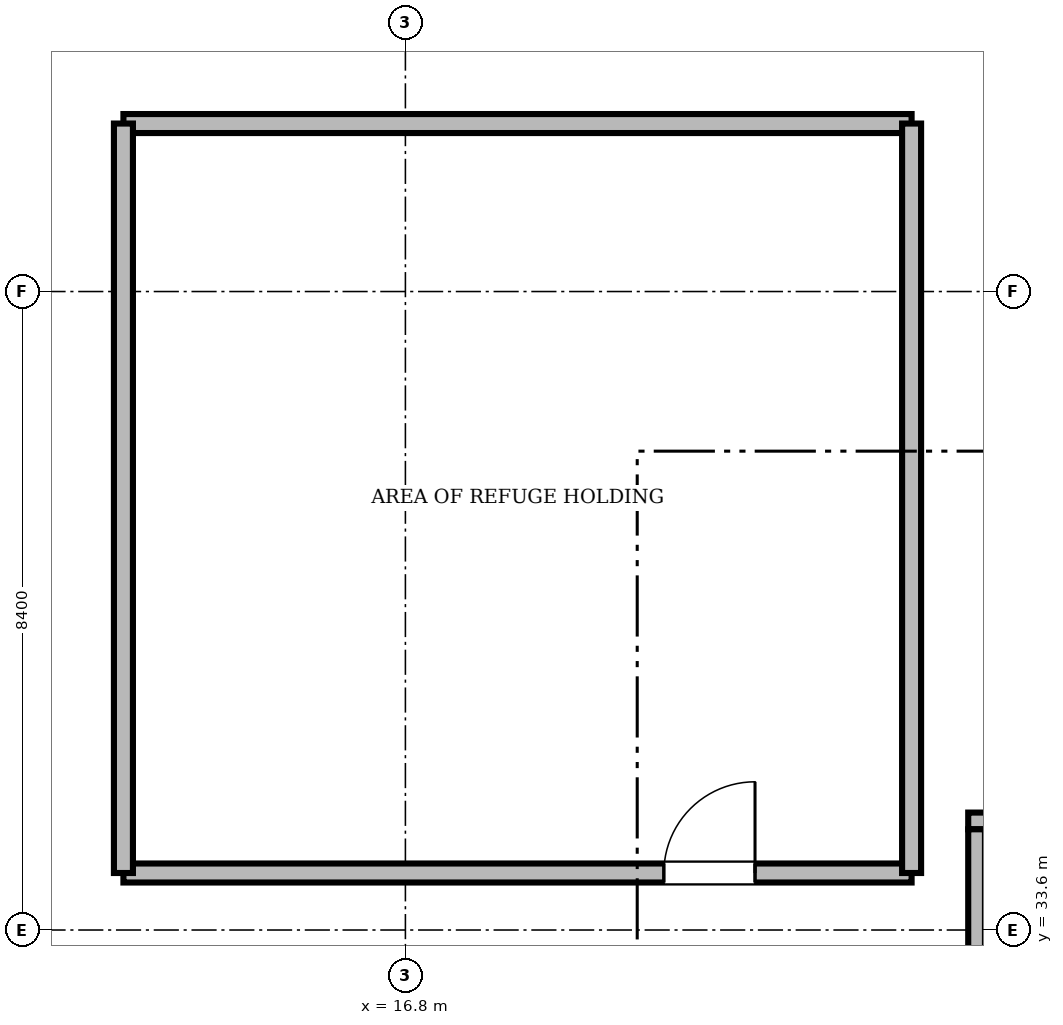
"""IFC4 building model, lengths in metres.
Left out: names, types, materials, properties, quantities, classifications, styles, units other than length and angle.
Written with IfcOpenShell. Run it as: python <this file> out.ifc"""

import sys

from ifc_helpers import new_model, si_unit, direction, frame, frame_2d, origin, origin_2d, place, context, subcontext, project, spatial, rectangle, i_section, extrude, source, transform, mapped, element, fill, save


model = new_model("IFC4")
c1 = context("Model", 3, precision=1e-05, world=origin(), true_north=direction((0.0, 1.0)))
c2 = subcontext(c1, "Body", "Model", "MODEL_VIEW")
j1 = project(units=[si_unit("LENGTHUNIT", "METRE"), si_unit("PLANEANGLEUNIT", "RADIAN")], contexts=[c1])
p1 = place(None, origin())
s1 = spatial("IfcSite", under=j1, at=p1, CompositionType="ELEMENT")
p2 = place(p1, origin())
s2 = spatial("IfcBuilding", under=s1, at=p2, CompositionType="ELEMENT")
p3 = place(p2, frame((0.0, 0.0, 166.8)))
s3 = spatial("IfcBuildingStorey", under=s2, at=p3, CompositionType="ELEMENT", Elevation=166.8)
m1 = source(origin(), c2, "Body", "SweptSolid", [
    extrude(rectangle(XDim=1.6, YDim=1.6, at=origin_2d()), origin(), (0.0, 0.0, 1.0), 6.543),
])
p4 = place(p3, frame((7.75, 36.54, 0.0), z_axis=(0.687744647911, 0.0, 0.725952683906), x_axis=(0.0, 1.0, 0.0)))
e1 = element("IfcColumn", 1, at=p4, inside=s3, PredefinedType="COLUMN", context=c2, shape_type="MappedRepresentation", body=[
    mapped(m1, transform((0.0, 0.0, 0.0), scale=1.0)),
])
m2 = source(origin(), c2, "Body", "SweptSolid", [
    extrude(i_section(OverallWidth=0.414, OverallDepth=0.432, WebThickness=0.026, FlangeThickness=0.04, FilletRadius=0.015, at=origin_2d()), origin(), (0.0, 0.0, 1.0), 6.543),
])
p5 = place(p3, frame((7.75, 43.45, 0.0), z_axis=(0.687744647911, 0.0, 0.725952683906), x_axis=(0.0, 1.0, 0.0)))
e2 = element("IfcColumn", 2, at=p5, inside=s3, PredefinedType="COLUMN", context=c2, shape_type="MappedRepresentation", body=[
    mapped(m2, transform((0.0, 0.0, 0.0), scale=1.0)),
])
m3 = source(origin(), c2, "Body", "SweptSolid", [
    extrude(rectangle(XDim=1.89, YDim=0.22, at=frame_2d((0.945, 0.0))), origin(), (0.0, 0.0, 1.0), 4.75),
])
p6 = place(p3, frame((24.205, 35.035, 0.0), z_axis=(0.0, 0.0, 1.0), x_axis=(1.0, 0.0, 0.0)))
e3 = element("IfcWall", 3, at=p6, inside=s3, PredefinedType="SOLIDWALL", context=c2, shape_type="MappedRepresentation", body=[
    mapped(m3, transform((0.0, 0.0, 0.0), scale=1.0)),
])
m4 = source(origin(), c2, "Body", "SweptSolid", [
    extrude(rectangle(XDim=1.75, YDim=0.22, at=frame_2d((0.875, 0.0))), origin(), (0.0, 0.0, 1.0), 4.75),
])
p7 = place(p3, frame((24.315, 33.175, 0.0), z_axis=(0.0, 0.0, 1.0), x_axis=(0.0, 1.0, 0.0)))
e4 = element("IfcWall", 4, at=p7, inside=s3, PredefinedType="SOLIDWALL", context=c2, shape_type="MappedRepresentation", body=[
    mapped(m4, transform((0.0, 0.0, 0.0), scale=1.0)),
])
m5 = source(origin(), c2, "Body", "SweptSolid", [
    extrude(rectangle(XDim=10.37, YDim=0.25, at=frame_2d((5.185, 0.0))), origin(), (0.0, 0.0, 1.0), 4.75),
])
p8 = place(p3, frame((13.09, 34.35, 0.0), z_axis=(0.0, 0.0, 1.0), x_axis=(1.0, 0.0, 0.0)))
e5 = element("IfcWall", 5, at=p8, inside=s3, PredefinedType="SOLIDWALL", context=c2, shape_type="MappedRepresentation", body=[
    mapped(m5, transform((0.0, 0.0, 0.0), scale=1.0)),
])
m6 = source(origin(), c2, "Body", "SweptSolid", [
    extrude(rectangle(XDim=1.2, YDim=2.2, at=frame_2d((0.6, 1.1))), frame((0.0, 0.135, 0.0), z_axis=(0.0, -1.0, 0.0), x_axis=(1.0, 0.0, 0.0)), (0.0, 0.0, 1.0), 0.27),
])
p9 = place(p8, frame((7.11, 0.0, 0.0)))
e6 = element("IfcOpeningElement", 6, at=p9, cuts=e5, PredefinedType="OPENING", context=c2, shape_type="MappedRepresentation", body=[
    mapped(m6, transform((0.0, 0.0, 0.0), scale=1.0)),
])
m7 = source(origin(), c2, "Body", "SweptSolid", [
    extrude(rectangle(XDim=10.37, YDim=0.25, at=frame_2d((5.185, 0.0))), origin(), (0.0, 0.0, 1.0), 4.026),
])
p10 = place(p3, frame((13.09, 44.21, 0.0), z_axis=(0.0, 0.0, 1.0), x_axis=(1.0, 0.0, 0.0)))
e7 = element("IfcWall", 7, at=p10, inside=s3, PredefinedType="SOLIDWALL", context=c2, shape_type="MappedRepresentation", body=[
    mapped(m7, transform((0.0, 0.0, 0.0), scale=1.0)),
])
m8 = source(origin(), c2, "Body", "SweptSolid", [
    extrude(rectangle(XDim=9.86, YDim=0.25, at=frame_2d((4.93, 0.0))), origin(), (0.0, 0.0, 1.0), 4.026),
])
p11 = place(p3, frame((13.09, 34.35, 0.0), z_axis=(0.0, 0.0, 1.0), x_axis=(0.0, 1.0, 0.0)))
e8 = element("IfcWall", 8, at=p11, inside=s3, PredefinedType="SOLIDWALL", context=c2, shape_type="MappedRepresentation", body=[
    mapped(m8, transform((0.0, 0.0, 0.0), scale=1.0)),
])
m9 = source(origin(), c2, "Body", "SweptSolid", [
    extrude(rectangle(XDim=9.86, YDim=0.25, at=frame_2d((4.93, 0.0))), origin(), (0.0, 0.0, 1.0), 4.75),
])
p12 = place(p3, frame((23.46, 34.35, 0.0), z_axis=(0.0, 0.0, 1.0), x_axis=(0.0, 1.0, 0.0)))
e9 = element("IfcWall", 9, at=p12, inside=s3, PredefinedType="SOLIDWALL", context=c2, shape_type="MappedRepresentation", body=[
    mapped(m9, transform((0.0, 0.0, 0.0), scale=1.0)),
])
m10 = source(origin(), c2, "Body", "SweptSolid", [
    extrude(rectangle(XDim=1.2, YDim=2.2, at=frame_2d((0.6, 1.1))), frame((0.0, 0.025, 0.0), z_axis=(0.0, -1.0, 0.0), x_axis=(1.0, 0.0, 0.0)), (0.0, 0.0, 1.0), 0.05),
])
p13 = place(p9, origin())
e10 = element("IfcDoor", 10, at=p13, inside=s3, OperationType="SINGLE_SWING_RIGHT", PredefinedType="DOOR", context=c2, shape_type="MappedRepresentation", body=[
    mapped(m10, transform((0.0, 0.0, 0.0), scale=1.0)),
])
fill(e6, e10)
save(model, sys.argv[1])
